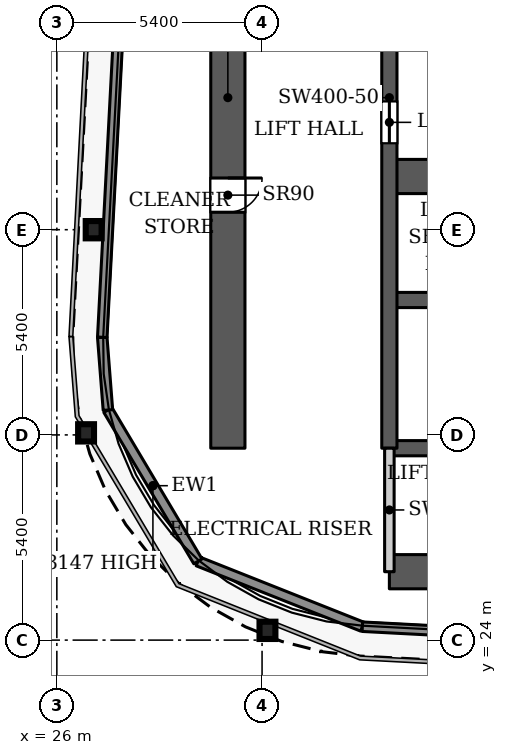
"""IFC4 building model, lengths in metres.
Left out: names, types, materials, properties, quantities, classifications, styles, units other than length and angle.
Written with IfcOpenShell. Run it as: python <this file> out.ifc"""

import sys

from ifc_helpers import new_model, si_unit, direction, frame, frame_2d, origin, origin_2d, place, context, subcontext, project, spatial, rectangle, i_section, extrude, source, transform, mapped, element, fill, save


model = new_model("IFC4")
c1 = context("Model", 3, precision=1e-05, world=origin(), true_north=direction((0.0, 1.0)))
c2 = subcontext(c1, "Body", "Model", "MODEL_VIEW")
j1 = project(units=[si_unit("LENGTHUNIT", "METRE"), si_unit("PLANEANGLEUNIT", "RADIAN")], contexts=[c1])
p1 = place(None, origin())
s1 = spatial("IfcSite", under=j1, at=p1, CompositionType="ELEMENT")
p2 = place(p1, origin())
s2 = spatial("IfcBuilding", under=s1, at=p2, CompositionType="ELEMENT")
p3 = place(p2, frame((0.0, 0.0, 140.9)))
s3 = spatial("IfcBuildingStorey", under=s2, at=p3, CompositionType="ELEMENT", Elevation=140.9)
for number, where, z_axis, x_axis in (
    (1, (31.542, 24.257, 0.0), (0.0, 0.0, 1.0), (1.0, 0.0, 0.0)),
    (2, (26.769, 29.454, 0.0), (0.0, 0.0, 1.0), (1.0, 0.0, 0.0)),
    (3, (26.969, 34.8, 0.0), (0.0, 0.0, 1.0), (1.0, 0.0, 0.0)),
):
    element("IfcColumn", number, at=place(p3, frame(where, z_axis=z_axis, x_axis=x_axis)), inside=s3, PredefinedType="COLUMN", context=c2, shape_type="SweptSolid", body=[
        extrude(i_section(OverallWidth=0.418, OverallDepth=0.455, WebThickness=0.042, FlangeThickness=0.068, FilletRadius=0.014, at=origin_2d()), origin(), (0.0, 0.0, 1.0), 3.9),
    ])
p4 = place(p3, frame((34.75, 25.8, 0.0), z_axis=(0.0, 0.0, 1.0), x_axis=(1.0, 0.0, 0.0)))
e4 = element("IfcWall", 4, at=p4, inside=s3, PredefinedType="SHEAR", context=c2, shape_type="SweptSolid", body=[
    extrude(rectangle(XDim=18.4, YDim=0.9, at=frame_2d((9.2, 0.0))), origin(), (0.0, 0.0, 1.0), 3.9),
])
p5 = place(p3, frame((34.75, 29.05, 0.0), z_axis=(0.0, 0.0, 1.0), x_axis=(1.0, 0.0, 0.0)))
e5 = element("IfcWall", 5, at=p5, inside=s3, PredefinedType="SHEAR", context=c2, shape_type="SweptSolid", body=[
    extrude(rectangle(XDim=18.4, YDim=0.4, at=frame_2d((9.2, 0.0))), origin(), (0.0, 0.0, 1.0), 3.9),
])
p6 = place(p5, frame((15.125, 0.0, 0.0)))
e6 = element("IfcOpeningElement", 6, at=p6, cuts=e5, PredefinedType="OPENING", context=c2, shape_type="SweptSolid", body=[
    extrude(rectangle(XDim=1.1, YDim=2.2, at=frame_2d((0.55, 1.1))), frame((0.0, 0.21, 0.0), z_axis=(0.0, -1.0, 0.0), x_axis=(1.0, 0.0, 0.0)), (0.0, 0.0, 1.0), 0.42),
])
p7 = place(p3, frame((34.75, 32.95, 0.0), z_axis=(0.0, 0.0, 1.0), x_axis=(1.0, 0.0, 0.0)))
e7 = element("IfcWall", 7, at=p7, inside=s3, PredefinedType="SHEAR", context=c2, shape_type="SweptSolid", body=[
    extrude(rectangle(XDim=14.25, YDim=0.4, at=frame_2d((7.125, 0.0))), origin(), (0.0, 0.0, 1.0), 3.9),
])
p8 = place(p3, frame((34.75, 36.2, 0.0), z_axis=(0.0, 0.0, 1.0), x_axis=(1.0, 0.0, 0.0)))
e8 = element("IfcWall", 8, at=p8, inside=s3, PredefinedType="SHEAR", context=c2, shape_type="SweptSolid", body=[
    extrude(rectangle(XDim=18.4, YDim=0.9, at=frame_2d((9.2, 0.0))), origin(), (0.0, 0.0, 1.0), 3.9),
])
p9 = place(p8, frame((16.9, 0.0, 0.0)))
e9 = element("IfcOpeningElement", 9, at=p9, cuts=e8, PredefinedType="OPENING", context=c2, shape_type="SweptSolid", body=[
    extrude(rectangle(XDim=1.0, YDim=2.2, at=frame_2d((0.5, 1.1))), frame((0.0, 0.46, 0.0), z_axis=(0.0, -1.0, 0.0), x_axis=(1.0, 0.0, 0.0)), (0.0, 0.0, 1.0), 0.92),
])
p10 = place(p3, frame((34.75, 29.05, 0.0), z_axis=(0.0, 0.0, 1.0), x_axis=(0.0, 1.0, 0.0)))
e10 = element("IfcWall", 10, at=p10, inside=s3, PredefinedType="SHEAR", context=c2, shape_type="SweptSolid", body=[
    extrude(rectangle(XDim=18.45, YDim=0.4, at=frame_2d((9.225, 0.0))), origin(), (0.0, 0.0, 1.0), 3.9),
])
p11 = place(p10, frame((8.025, 0.0, 0.0)))
e11 = element("IfcOpeningElement", 11, at=p11, cuts=e10, PredefinedType="OPENING", context=c2, shape_type="SweptSolid", body=[
    extrude(rectangle(XDim=1.1, YDim=2.2, at=frame_2d((0.55, 1.1))), frame((0.0, 0.21, 0.0), z_axis=(0.0, -1.0, 0.0), x_axis=(1.0, 0.0, 0.0)), (0.0, 0.0, 1.0), 0.42),
])
p12 = place(p10, frame((10.875, 0.0, 0.0)))
e12 = element("IfcOpeningElement", 12, at=p12, cuts=e10, PredefinedType="OPENING", context=c2, shape_type="SweptSolid", body=[
    extrude(rectangle(XDim=1.1, YDim=2.2, at=frame_2d((0.55, 1.1))), frame((0.0, 0.21, 0.0), z_axis=(0.0, -1.0, 0.0), x_axis=(1.0, 0.0, 0.0)), (0.0, 0.0, 1.0), 0.42),
])
p13 = place(p10, frame((13.725, 0.0, 0.0)))
e13 = element("IfcOpeningElement", 13, at=p13, cuts=e10, PredefinedType="OPENING", context=c2, shape_type="SweptSolid", body=[
    extrude(rectangle(XDim=1.1, YDim=2.2, at=frame_2d((0.55, 1.1))), frame((0.0, 0.21, 0.0), z_axis=(0.0, -1.0, 0.0), x_axis=(1.0, 0.0, 0.0)), (0.0, 0.0, 1.0), 0.42),
])
p14 = place(p10, frame((15.95, 0.0, 0.0)))
e14 = element("IfcOpeningElement", 14, at=p14, cuts=e10, PredefinedType="OPENING", context=c2, shape_type="SweptSolid", body=[
    extrude(rectangle(XDim=1.1, YDim=2.2, at=frame_2d((0.55, 1.1))), frame((0.0, 0.21, 0.0), z_axis=(0.0, -1.0, 0.0), x_axis=(1.0, 0.0, 0.0)), (0.0, 0.0, 1.0), 0.42),
])
p15 = place(p3, frame((30.5, 29.05, 0.0), z_axis=(0.0, 0.0, 1.0), x_axis=(0.0, 1.0, 0.0)))
e15 = element("IfcWall", 15, at=p15, inside=s3, PredefinedType="SHEAR", context=c2, shape_type="SweptSolid", body=[
    extrude(rectangle(XDim=18.45, YDim=0.9, at=frame_2d((9.225, 0.0))), origin(), (0.0, 0.0, 1.0), 3.9),
])
p16 = place(p15, frame((6.21, 0.0, 0.0)))
e16 = element("IfcOpeningElement", 16, at=p16, cuts=e15, PredefinedType="OPENING", context=c2, shape_type="SweptSolid", body=[
    extrude(rectangle(XDim=0.9, YDim=2.2, at=frame_2d((0.45, 1.1))), frame((0.0, 0.46, 0.0), z_axis=(0.0, -1.0, 0.0), x_axis=(1.0, 0.0, 0.0)), (0.0, 0.0, 1.0), 0.92),
])
p17 = place(p15, frame((10.684, 0.0, 0.0)))
e17 = element("IfcOpeningElement", 17, at=p17, cuts=e15, PredefinedType="OPENING", context=c2, shape_type="SweptSolid", body=[
    extrude(rectangle(XDim=0.9, YDim=2.2, at=frame_2d((0.45, 1.1))), frame((0.0, 0.46, 0.0), z_axis=(0.0, -1.0, 0.0), x_axis=(1.0, 0.0, 0.0)), (0.0, 0.0, 1.0), 0.92),
])
p18 = place(p3, frame((34.039, 24.353, 0.0), z_axis=(0.0, 0.0, 1.0), x_axis=(-0.929352825399, 0.369192803184, 0.0)))
e18 = element("IfcWall", 18, at=p18, inside=s3, PredefinedType="SOLIDWALL", context=c2, shape_type="SweptSolid", body=[
    extrude(rectangle(XDim=4.656, YDim=0.25, at=frame_2d((2.328, 0.0))), origin(), (0.0, 0.0, 1.0), 3.75),
])
p19 = place(p3, frame((29.712, 26.072, 0.0), z_axis=(0.0, 0.0, 1.0), x_axis=(-0.511028049012, 0.859564036662, 0.0)))
e19 = element("IfcWall", 19, at=p19, inside=s3, PredefinedType="SOLIDWALL", context=c2, shape_type="SweptSolid", body=[
    extrude(rectangle(XDim=4.634, YDim=0.25, at=frame_2d((2.317, 0.0))), origin(), (0.0, 0.0, 1.0), 3.147),
])
p20 = place(p3, frame((27.344, 30.055, 0.0), z_axis=(0.0, 0.0, 1.0), x_axis=(-0.077571675317, 0.99698677784, 0.0)))
e20 = element("IfcWall", 20, at=p20, inside=s3, PredefinedType="SOLIDWALL", context=c2, shape_type="SweptSolid", body=[
    extrude(rectangle(XDim=1.92, YDim=0.25, at=frame_2d((0.96, 0.0))), origin(), (0.0, 0.0, 1.0), 3.75),
])
p21 = place(p3, frame((27.195, 31.969, 0.0), z_axis=(0.0, 0.0, 1.0), x_axis=(0.052554995867, 0.998618031286, 0.0)))
e21 = element("IfcWall", 21, at=p21, inside=s3, PredefinedType="SOLIDWALL", context=c2, shape_type="SweptSolid", body=[
    extrude(rectangle(XDim=66.787, YDim=0.25, at=frame_2d((33.394, 0.0))), origin(), (0.0, 0.0, 1.0), 3.75),
])
p22 = place(p3, frame((100.586, 20.85, 0.0), z_axis=(0.0, 0.0, 1.0), x_axis=(-0.99861746497, 0.052565755559, 0.0)))
e22 = element("IfcWall", 22, at=p22, inside=s3, PredefinedType="SOLIDWALL", context=c2, shape_type="SweptSolid", body=[
    extrude(rectangle(XDim=66.639, YDim=0.25, at=frame_2d((33.319, 0.0))), origin(), (0.0, 0.0, 1.0), 3.75),
])
p23 = place(p3, frame((34.75, 25.8, 0.0), z_axis=(0.0, 0.0, 1.0), x_axis=(0.0, 1.0, 0.0)))
e23 = element("IfcWall", 23, at=p23, inside=s3, PredefinedType="PARTITIONING", context=c2, shape_type="SweptSolid", body=[
    extrude(rectangle(XDim=3.25, YDim=0.25, at=frame_2d((1.625, 0.0))), origin(), (0.0, 0.0, 1.0), 3.9),
])
m1 = source(origin(), c2, "Body", "SweptSolid", [
    extrude(rectangle(XDim=1.1, YDim=2.2, at=frame_2d((0.55, 1.1))), frame((0.0, 0.025, 0.0), z_axis=(0.0, -1.0, 0.0), x_axis=(1.0, 0.0, 0.0)), (0.0, 0.0, 1.0), 0.05),
])
p24 = place(p11, origin())
e24 = element("IfcDoor", 24, at=p24, inside=s3, OperationType="SLIDING_TO_LEFT", PredefinedType="DOOR", context=c2, shape_type="MappedRepresentation", body=[
    mapped(m1, transform((0.0, 0.0, 0.0), x_axis=(1.0, 0.0, 0.0), y_axis=(0.0, 1.0, 0.0), z_axis=(0.0, 0.0, 1.0), scale=1.0)),
])
fill(e11, e24)
m2 = source(origin(), c2, "Body", "SweptSolid", [
    extrude(rectangle(XDim=0.9, YDim=2.2, at=frame_2d((0.45, 1.1))), frame((0.0, 0.025, 0.0), z_axis=(0.0, -1.0, 0.0), x_axis=(1.0, 0.0, 0.0)), (0.0, 0.0, 1.0), 0.05),
])
p25 = place(p16, origin())
e25 = element("IfcDoor", 25, at=p25, inside=s3, OperationType="SINGLE_SWING_RIGHT", PredefinedType="DOOR", context=c2, shape_type="MappedRepresentation", body=[
    mapped(m2, transform((0.0, 0.0, 0.0), x_axis=(1.0, 0.0, 0.0), y_axis=(0.0, 1.0, 0.0), z_axis=(0.0, 0.0, 1.0), scale=1.0)),
])
fill(e16, e25)
save(model, sys.argv[1])
